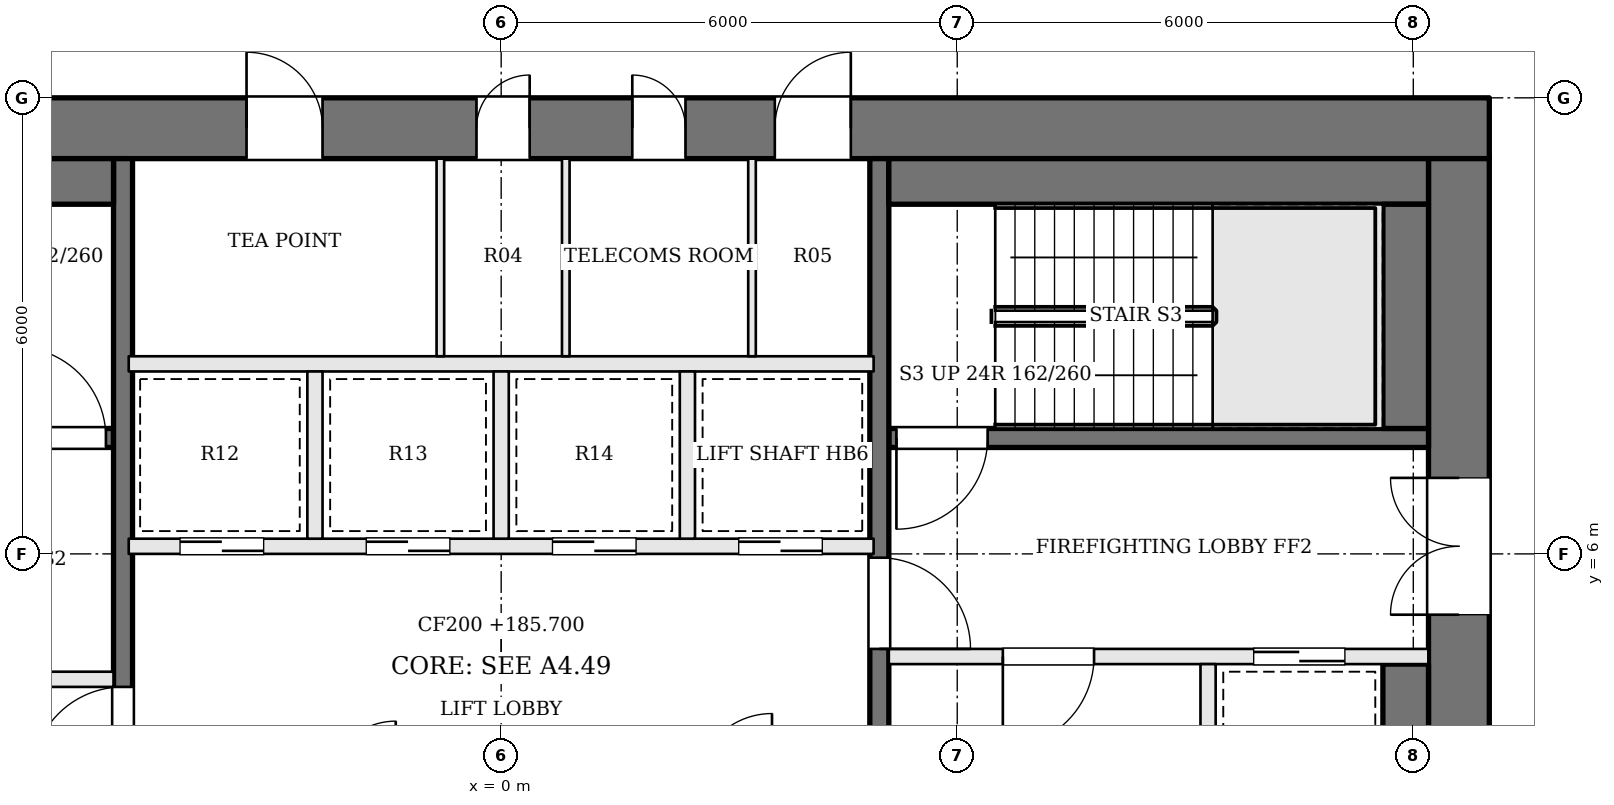
"""IFC4 building model, lengths in metres.
Left out: names, types, materials, properties, quantities, classifications, styles, units other than length and angle.
Written with IfcOpenShell. Run it as: python <this file> out.ifc"""

import sys

from ifc_helpers import new_model, si_unit, direction, frame, frame_2d, origin, place, context, subcontext, project, spatial, rectangle, extrude, element, fill, save


model = new_model("IFC4")
c1 = context("Model", 3, precision=1e-05, world=origin(), true_north=direction((0.0, 1.0)))
c2 = subcontext(c1, "Body", "Model", "MODEL_VIEW")
j1 = project(units=[si_unit("LENGTHUNIT", "METRE"), si_unit("PLANEANGLEUNIT", "RADIAN")], contexts=[c1])
p1 = place(None, origin())
s1 = spatial("IfcSite", under=j1, at=p1, CompositionType="ELEMENT")
p2 = place(p1, origin())
s2 = spatial("IfcBuilding", under=s1, at=p2, CompositionType="ELEMENT")
p3 = place(p2, frame((0.0, 0.0, 185.7)))
s3 = spatial("IfcBuildingStorey", under=s2, at=p3, CompositionType="ELEMENT", Elevation=185.7)
p4 = place(p3, frame((-13.0, 11.6, 0.0), z_axis=(0.0, 0.0, 1.0), x_axis=(1.0, 0.0, 0.0)))
e1 = element("IfcWall", 1, at=p4, inside=s3, PredefinedType="SHEAR", context=c2, shape_type="SweptSolid", body=[
    extrude(rectangle(XDim=26.0, YDim=0.8, at=frame_2d((13.0, 0.0))), origin(), (0.0, 0.0, 1.0), 3.9),
])
p5 = place(p4, frame((9.65, 0.0, 0.0)))
e2 = element("IfcOpeningElement", 2, at=p5, cuts=e1, PredefinedType="OPENING", context=c2, shape_type="SweptSolid", body=[
    extrude(rectangle(XDim=1.0, YDim=2.1, at=frame_2d((0.5, 1.05))), frame((0.0, 0.41, 0.0), z_axis=(0.0, -1.0, 0.0), x_axis=(1.0, 0.0, 0.0)), (0.0, 0.0, 1.0), 0.82),
])
p6 = place(p4, frame((12.675, 0.0, 0.0)))
e3 = element("IfcOpeningElement", 3, at=p6, cuts=e1, PredefinedType="OPENING", context=c2, shape_type="SweptSolid", body=[
    extrude(rectangle(XDim=0.7, YDim=2.1, at=frame_2d((0.35, 1.05))), frame((0.0, 0.41, 0.0), z_axis=(0.0, -1.0, 0.0), x_axis=(1.0, 0.0, 0.0)), (0.0, 0.0, 1.0), 0.82),
])
p7 = place(p4, frame((14.725, 0.0, 0.0)))
e4 = element("IfcOpeningElement", 4, at=p7, cuts=e1, PredefinedType="OPENING", context=c2, shape_type="SweptSolid", body=[
    extrude(rectangle(XDim=0.7, YDim=2.1, at=frame_2d((0.35, 1.05))), frame((0.0, 0.41, 0.0), z_axis=(0.0, -1.0, 0.0), x_axis=(1.0, 0.0, 0.0)), (0.0, 0.0, 1.0), 0.82),
])
p8 = place(p4, frame((16.6, 0.0, 0.0)))
e5 = element("IfcOpeningElement", 5, at=p8, cuts=e1, PredefinedType="OPENING", context=c2, shape_type="SweptSolid", body=[
    extrude(rectangle(XDim=1.0, YDim=2.1, at=frame_2d((0.5, 1.05))), frame((0.0, 0.41, 0.0), z_axis=(0.0, -1.0, 0.0), x_axis=(1.0, 0.0, 0.0)), (0.0, 0.0, 1.0), 0.82),
])
p9 = place(p3, frame((12.6, -2.2, 0.0), z_axis=(0.0, 0.0, 1.0), x_axis=(0.0, 1.0, 0.0)))
e6 = element("IfcWall", 6, at=p9, inside=s3, PredefinedType="SHEAR", context=c2, shape_type="SweptSolid", body=[
    extrude(rectangle(XDim=13.4, YDim=0.8, at=frame_2d((6.7, 0.0))), origin(), (0.0, 0.0, 1.0), 3.9),
])
p10 = place(p9, frame((7.4, 0.0, 0.0)))
e7 = element("IfcOpeningElement", 7, at=p10, cuts=e6, PredefinedType="OPENING", context=c2, shape_type="SweptSolid", body=[
    extrude(rectangle(XDim=1.8, YDim=2.1, at=frame_2d((0.9, 1.05))), frame((0.0, 0.41, 0.0), z_axis=(0.0, -1.0, 0.0), x_axis=(1.0, 0.0, 0.0)), (0.0, 0.0, 1.0), 0.82),
])
p11 = place(p3, frame((12.2, 7.525, 0.0), z_axis=(0.0, 0.0, 1.0), x_axis=(-1.0, 0.0, 0.0)))
e8 = element("IfcWall", 8, at=p11, inside=s3, PredefinedType="SOLIDWALL", context=c2, shape_type="SweptSolid", body=[
    extrude(rectangle(XDim=7.1, YDim=0.25, at=frame_2d((3.55, 0.0))), origin(), (0.0, 0.0, 1.0), 3.7),
])
p12 = place(p11, frame((5.8, 0.0, 0.0)))
e9 = element("IfcOpeningElement", 9, at=p12, cuts=e8, PredefinedType="OPENING", context=c2, shape_type="SweptSolid", body=[
    extrude(rectangle(XDim=1.2, YDim=2.1, at=frame_2d((0.6, 1.05))), frame((0.0, 0.135, 0.0), z_axis=(0.0, -1.0, 0.0), x_axis=(1.0, 0.0, 0.0)), (0.0, 0.0, 1.0), 0.27),
])
p13 = place(p3, frame((-12.2, 4.35, 0.0), z_axis=(0.0, 0.0, 1.0), x_axis=(1.0, 0.0, 0.0)))
e10 = element("IfcWall", 10, at=p13, inside=s3, PredefinedType="SOLIDWALL", context=c2, shape_type="SweptSolid", body=[
    extrude(rectangle(XDim=7.1, YDim=0.2, at=frame_2d((3.55, 0.0))), origin(), (0.0, 0.0, 1.0), 3.7),
])
p14 = place(p13, frame((4.4, 0.0, 0.0)))
e11 = element("IfcOpeningElement", 11, at=p14, cuts=e10, PredefinedType="OPENING", context=c2, shape_type="SweptSolid", body=[
    extrude(rectangle(XDim=1.2, YDim=2.1, at=frame_2d((0.6, 1.05))), frame((0.0, 0.11, 0.0), z_axis=(0.0, -1.0, 0.0), x_axis=(1.0, 0.0, 0.0)), (0.0, 0.0, 1.0), 0.22),
])
p15 = place(p13, frame((1.1, 0.0, 0.0)))
e12 = element("IfcOpeningElement", 12, at=p15, cuts=e10, PredefinedType="OPENING", context=c2, shape_type="SweptSolid", body=[
    extrude(rectangle(XDim=1.2, YDim=2.1, at=frame_2d((0.6, 1.05))), frame((0.0, 0.11, 0.0), z_axis=(0.0, -1.0, 0.0), x_axis=(1.0, 0.0, 0.0)), (0.0, 0.0, 1.0), 0.22),
])
p16 = place(p3, frame((12.2, 4.65, 0.0), z_axis=(0.0, 0.0, 1.0), x_axis=(-1.0, 0.0, 0.0)))
e13 = element("IfcWall", 13, at=p16, inside=s3, PredefinedType="SOLIDWALL", context=c2, shape_type="SweptSolid", body=[
    extrude(rectangle(XDim=7.1, YDim=0.2, at=frame_2d((3.55, 0.0))), origin(), (0.0, 0.0, 1.0), 3.7),
])
p17 = place(p16, frame((4.4, 0.0, 0.0)))
e14 = element("IfcOpeningElement", 14, at=p17, cuts=e13, PredefinedType="OPENING", context=c2, shape_type="SweptSolid", body=[
    extrude(rectangle(XDim=1.2, YDim=2.1, at=frame_2d((0.6, 1.05))), frame((0.0, 0.11, 0.0), z_axis=(0.0, -1.0, 0.0), x_axis=(1.0, 0.0, 0.0)), (0.0, 0.0, 1.0), 0.22),
])
p18 = place(p16, frame((1.1, 0.0, 0.0)))
e15 = element("IfcOpeningElement", 15, at=p18, cuts=e13, PredefinedType="OPENING", context=c2, shape_type="SweptSolid", body=[
    extrude(rectangle(XDim=1.2, YDim=2.1, at=frame_2d((0.6, 1.05))), frame((0.0, 0.11, 0.0), z_axis=(0.0, -1.0, 0.0), x_axis=(1.0, 0.0, 0.0)), (0.0, 0.0, 1.0), 0.22),
])
p19 = place(p3, frame((-12.2, 7.525, 0.0), z_axis=(0.0, 0.0, 1.0), x_axis=(1.0, 0.0, 0.0)))
e16 = element("IfcWall", 16, at=p19, inside=s3, PredefinedType="SOLIDWALL", context=c2, shape_type="SweptSolid", body=[
    extrude(rectangle(XDim=7.1, YDim=0.25, at=frame_2d((3.55, 0.0))), origin(), (0.0, 0.0, 1.0), 3.7),
])
p20 = place(p19, frame((5.8, 0.0, 0.0)))
e17 = element("IfcOpeningElement", 17, at=p20, cuts=e16, PredefinedType="OPENING", context=c2, shape_type="SweptSolid", body=[
    extrude(rectangle(XDim=1.2, YDim=2.1, at=frame_2d((0.6, 1.05))), frame((0.0, 0.135, 0.0), z_axis=(0.0, -1.0, 0.0), x_axis=(1.0, 0.0, 0.0)), (0.0, 0.0, 1.0), 0.27),
])
p21 = place(p3, frame((9.3, 4.55, 0.0), z_axis=(0.0, 0.0, 1.0), x_axis=(0.0, -1.0, 0.0)))
e18 = element("IfcWall", 18, at=p21, inside=s3, PredefinedType="SOLIDWALL", context=c2, shape_type="SweptSolid", body=[
    extrude(rectangle(XDim=3.0, YDim=0.2, at=frame_2d((1.5, 0.0))), origin(), (0.0, 0.0, 1.0), 3.7),
])
p22 = place(p3, frame((-4.975, -2.2, 0.0), z_axis=(0.0, 0.0, 1.0), x_axis=(0.0, 1.0, 0.0)))
e19 = element("IfcWall", 19, at=p22, inside=s3, PredefinedType="SOLIDWALL", context=c2, shape_type="SweptSolid", body=[
    extrude(rectangle(XDim=13.4, YDim=0.25, at=frame_2d((6.7, 0.0))), origin(), (0.0, 0.0, 1.0), 3.7),
])
p23 = place(p22, frame((5.25, 0.0, 0.0)))
e20 = element("IfcOpeningElement", 20, at=p23, cuts=e19, PredefinedType="OPENING", context=c2, shape_type="SweptSolid", body=[
    extrude(rectangle(XDim=1.2, YDim=2.1, at=frame_2d((0.6, 1.05))), frame((0.0, 0.135, 0.0), z_axis=(0.0, -1.0, 0.0), x_axis=(1.0, 0.0, 0.0)), (0.0, 0.0, 1.0), 0.27),
])
p24 = place(p3, frame((4.975, 11.2, 0.0), z_axis=(0.0, 0.0, 1.0), x_axis=(0.0, -1.0, 0.0)))
e21 = element("IfcWall", 21, at=p24, inside=s3, PredefinedType="SOLIDWALL", context=c2, shape_type="SweptSolid", body=[
    extrude(rectangle(XDim=13.4, YDim=0.25, at=frame_2d((6.7, 0.0))), origin(), (0.0, 0.0, 1.0), 3.7),
])
p25 = place(p24, frame((5.25, 0.0, 0.0)))
e22 = element("IfcOpeningElement", 22, at=p25, cuts=e21, PredefinedType="OPENING", context=c2, shape_type="SweptSolid", body=[
    extrude(rectangle(XDim=1.2, YDim=2.1, at=frame_2d((0.6, 1.05))), frame((0.0, 0.135, 0.0), z_axis=(0.0, -1.0, 0.0), x_axis=(1.0, 0.0, 0.0)), (0.0, 0.0, 1.0), 0.27),
])
for number, where, z_axis, x_axis in (
    (23, (-12.2, 10.9, 0.0), (0.0, 0.0, 1.0), (1.0, 0.0, 0.0)),
    (24, (12.2, 10.9, 0.0), (0.0, 0.0, 1.0), (-1.0, 0.0, 0.0)),
):
    element("IfcWall", number, at=place(p3, frame(where, z_axis=z_axis, x_axis=x_axis)), inside=s3, PredefinedType="SOLIDWALL", context=c2, shape_type="SweptSolid", body=[
        extrude(rectangle(XDim=7.1, YDim=0.6, at=frame_2d((3.55, 0.0))), origin(), (0.0, 0.0, 1.0), 3.7),
    ])
p26 = place(p3, frame((11.9, 10.6, 0.0), z_axis=(0.0, 0.0, 1.0), x_axis=(0.0, -1.0, 0.0)))
e25 = element("IfcWall", 25, at=p26, inside=s3, PredefinedType="SOLIDWALL", context=c2, shape_type="SweptSolid", body=[
    extrude(rectangle(XDim=2.95, YDim=0.6, at=frame_2d((1.475, 0.0))), origin(), (0.0, 0.0, 1.0), 3.7),
])
p27 = place(p3, frame((11.9, 4.55, 0.0), z_axis=(0.0, 0.0, 1.0), x_axis=(0.0, -1.0, 0.0)))
e26 = element("IfcWall", 26, at=p27, inside=s3, PredefinedType="SOLIDWALL", context=c2, shape_type="SweptSolid", body=[
    extrude(rectangle(XDim=3.0, YDim=0.6, at=frame_2d((1.5, 0.0))), origin(), (0.0, 0.0, 1.0), 3.7),
])
p28 = place(p3, frame((-4.9, 6.1, 0.0), z_axis=(0.0, 0.0, 1.0), x_axis=(1.0, 0.0, 0.0)))
e27 = element("IfcWall", 27, at=p28, inside=s3, PredefinedType="SOLIDWALL", context=c2, shape_type="SweptSolid", body=[
    extrude(rectangle(XDim=9.8, YDim=0.2, at=frame_2d((4.9, 0.0))), origin(), (0.0, 0.0, 1.0), 3.7),
])
p29 = place(p28, frame((0.675, 0.0, 0.0)))
e28 = element("IfcOpeningElement", 28, at=p29, cuts=e27, PredefinedType="OPENING", context=c2, shape_type="SweptSolid", body=[
    extrude(rectangle(XDim=1.1, YDim=2.1, at=frame_2d((0.55, 1.05))), frame((0.0, 0.11, 0.0), z_axis=(0.0, -1.0, 0.0), x_axis=(1.0, 0.0, 0.0)), (0.0, 0.0, 1.0), 0.22),
])
p30 = place(p28, frame((3.125, 0.0, 0.0)))
e29 = element("IfcOpeningElement", 29, at=p30, cuts=e27, PredefinedType="OPENING", context=c2, shape_type="SweptSolid", body=[
    extrude(rectangle(XDim=1.1, YDim=2.1, at=frame_2d((0.55, 1.05))), frame((0.0, 0.11, 0.0), z_axis=(0.0, -1.0, 0.0), x_axis=(1.0, 0.0, 0.0)), (0.0, 0.0, 1.0), 0.22),
])
p31 = place(p28, frame((5.575, 0.0, 0.0)))
e30 = element("IfcOpeningElement", 30, at=p31, cuts=e27, PredefinedType="OPENING", context=c2, shape_type="SweptSolid", body=[
    extrude(rectangle(XDim=1.1, YDim=2.1, at=frame_2d((0.55, 1.05))), frame((0.0, 0.11, 0.0), z_axis=(0.0, -1.0, 0.0), x_axis=(1.0, 0.0, 0.0)), (0.0, 0.0, 1.0), 0.22),
])
p32 = place(p28, frame((8.025, 0.0, 0.0)))
e31 = element("IfcOpeningElement", 31, at=p32, cuts=e27, PredefinedType="OPENING", context=c2, shape_type="SweptSolid", body=[
    extrude(rectangle(XDim=1.1, YDim=2.1, at=frame_2d((0.55, 1.05))), frame((0.0, 0.11, 0.0), z_axis=(0.0, -1.0, 0.0), x_axis=(1.0, 0.0, 0.0)), (0.0, 0.0, 1.0), 0.22),
])
p33 = place(p3, frame((-4.9, 8.5, 0.0), z_axis=(0.0, 0.0, 1.0), x_axis=(1.0, 0.0, 0.0)))
e32 = element("IfcWall", 32, at=p33, inside=s3, PredefinedType="SOLIDWALL", context=c2, shape_type="SweptSolid", body=[
    extrude(rectangle(XDim=9.8, YDim=0.2, at=frame_2d((4.9, 0.0))), origin(), (0.0, 0.0, 1.0), 3.7),
])
for number, where, z_axis, x_axis in (
    (33, (-2.45, 6.2, 0.0), (0.0, 0.0, 1.0), (0.0, 1.0, 0.0)),
    (34, (0.0, 6.2, 0.0), (0.0, 0.0, 1.0), (0.0, 1.0, 0.0)),
    (35, (2.45, 6.2, 0.0), (0.0, 0.0, 1.0), (0.0, 1.0, 0.0)),
):
    element("IfcWall", number, at=place(p3, frame(where, z_axis=z_axis, x_axis=x_axis)), inside=s3, PredefinedType="SOLIDWALL", context=c2, shape_type="SweptSolid", body=[
        extrude(rectangle(XDim=2.2, YDim=0.2, at=frame_2d((1.1, 0.0))), origin(), (0.0, 0.0, 1.0), 3.7),
    ])
for number, where, z_axis, x_axis in (
    (36, (-0.8, 8.6, 0.0), (0.0, 0.0, 1.0), (0.0, 1.0, 0.0)),
    (37, (0.85, 8.6, 0.0), (0.0, 0.0, 1.0), (0.0, 1.0, 0.0)),
    (38, (3.3, 8.6, 0.0), (0.0, 0.0, 1.0), (0.0, 1.0, 0.0)),
):
    element("IfcWall", number, at=place(p3, frame(where, z_axis=z_axis, x_axis=x_axis)), inside=s3, PredefinedType="PARTITIONING", context=c2, shape_type="SweptSolid", body=[
        extrude(rectangle(XDim=2.6, YDim=0.1, at=frame_2d((1.3, 0.0))), origin(), (0.0, 0.0, 1.0), 3.7),
    ])
p34 = place(p10, origin())
e39 = element("IfcDoor", 39, at=p34, inside=s3, OperationType="DOUBLE_DOOR_SINGLE_SWING", PredefinedType="DOOR", context=c2, shape_type="SweptSolid", body=[
    extrude(rectangle(XDim=1.8, YDim=2.1, at=frame_2d((0.9, 1.05))), frame((0.0, 0.025, 0.0), z_axis=(0.0, -1.0, 0.0), x_axis=(1.0, 0.0, 0.0)), (0.0, 0.0, 1.0), 0.05),
])
fill(e7, e39)
p35 = place(p23, origin())
e40 = element("IfcDoor", 40, at=p35, inside=s3, OperationType="SINGLE_SWING_LEFT", PredefinedType="DOOR", context=c2, shape_type="SweptSolid", body=[
    extrude(rectangle(XDim=1.2, YDim=2.1, at=frame_2d((0.6, 1.05))), frame((0.0, 0.025, 0.0), z_axis=(0.0, -1.0, 0.0), x_axis=(1.0, 0.0, 0.0)), (0.0, 0.0, 1.0), 0.05),
])
fill(e20, e40)
p36 = place(p25, origin())
e41 = element("IfcDoor", 41, at=p36, inside=s3, OperationType="SINGLE_SWING_RIGHT", PredefinedType="DOOR", context=c2, shape_type="SweptSolid", body=[
    extrude(rectangle(XDim=1.2, YDim=2.1, at=frame_2d((0.6, 1.05))), frame((0.0, 0.025, 0.0), z_axis=(0.0, -1.0, 0.0), x_axis=(1.0, 0.0, 0.0)), (0.0, 0.0, 1.0), 0.05),
])
fill(e22, e41)
p37 = place(p17, origin())
e42 = element("IfcDoor", 42, at=p37, inside=s3, OperationType="SINGLE_SWING_RIGHT", PredefinedType="DOOR", context=c2, shape_type="SweptSolid", body=[
    extrude(rectangle(XDim=1.2, YDim=2.1, at=frame_2d((0.6, 1.05))), frame((0.0, 0.025, 0.0), z_axis=(0.0, -1.0, 0.0), x_axis=(1.0, 0.0, 0.0)), (0.0, 0.0, 1.0), 0.05),
])
fill(e14, e42)
p38 = place(p12, origin())
e43 = element("IfcDoor", 43, at=p38, inside=s3, OperationType="SINGLE_SWING_RIGHT", PredefinedType="DOOR", context=c2, shape_type="SweptSolid", body=[
    extrude(rectangle(XDim=1.2, YDim=2.1, at=frame_2d((0.6, 1.05))), frame((0.0, 0.025, 0.0), z_axis=(0.0, -1.0, 0.0), x_axis=(1.0, 0.0, 0.0)), (0.0, 0.0, 1.0), 0.05),
])
fill(e9, e43)
p39 = place(p20, origin())
e44 = element("IfcDoor", 44, at=p39, inside=s3, OperationType="SINGLE_SWING_LEFT", PredefinedType="DOOR", context=c2, shape_type="SweptSolid", body=[
    extrude(rectangle(XDim=1.2, YDim=2.1, at=frame_2d((0.6, 1.05))), frame((0.0, 0.025, 0.0), z_axis=(0.0, -1.0, 0.0), x_axis=(1.0, 0.0, 0.0)), (0.0, 0.0, 1.0), 0.05),
])
fill(e17, e44)
p40 = place(p18, origin())
e45 = element("IfcDoor", 45, at=p40, inside=s3, OperationType="SLIDING_TO_RIGHT", PredefinedType="DOOR", context=c2, shape_type="SweptSolid", body=[
    extrude(rectangle(XDim=1.2, YDim=2.1, at=frame_2d((0.6, 1.05))), frame((0.0, 0.025, 0.0), z_axis=(0.0, -1.0, 0.0), x_axis=(1.0, 0.0, 0.0)), (0.0, 0.0, 1.0), 0.05),
])
fill(e15, e45)
p41 = place(p29, origin())
e46 = element("IfcDoor", 46, at=p41, inside=s3, OperationType="SLIDING_TO_RIGHT", PredefinedType="DOOR", context=c2, shape_type="SweptSolid", body=[
    extrude(rectangle(XDim=1.1, YDim=2.1, at=frame_2d((0.55, 1.05))), frame((0.0, 0.025, 0.0), z_axis=(0.0, -1.0, 0.0), x_axis=(1.0, 0.0, 0.0)), (0.0, 0.0, 1.0), 0.05),
])
fill(e28, e46)
p42 = place(p30, origin())
e47 = element("IfcDoor", 47, at=p42, inside=s3, OperationType="SLIDING_TO_LEFT", PredefinedType="DOOR", context=c2, shape_type="SweptSolid", body=[
    extrude(rectangle(XDim=1.1, YDim=2.1, at=frame_2d((0.55, 1.05))), frame((0.0, 0.025, 0.0), z_axis=(0.0, -1.0, 0.0), x_axis=(1.0, 0.0, 0.0)), (0.0, 0.0, 1.0), 0.05),
])
fill(e29, e47)
p43 = place(p31, origin())
e48 = element("IfcDoor", 48, at=p43, inside=s3, OperationType="SLIDING_TO_RIGHT", PredefinedType="DOOR", context=c2, shape_type="SweptSolid", body=[
    extrude(rectangle(XDim=1.1, YDim=2.1, at=frame_2d((0.55, 1.05))), frame((0.0, 0.025, 0.0), z_axis=(0.0, -1.0, 0.0), x_axis=(1.0, 0.0, 0.0)), (0.0, 0.0, 1.0), 0.05),
])
fill(e30, e48)
p44 = place(p32, origin())
e49 = element("IfcDoor", 49, at=p44, inside=s3, OperationType="SLIDING_TO_LEFT", PredefinedType="DOOR", context=c2, shape_type="SweptSolid", body=[
    extrude(rectangle(XDim=1.1, YDim=2.1, at=frame_2d((0.55, 1.05))), frame((0.0, 0.025, 0.0), z_axis=(0.0, -1.0, 0.0), x_axis=(1.0, 0.0, 0.0)), (0.0, 0.0, 1.0), 0.05),
])
fill(e31, e49)
p45 = place(p5, origin())
e50 = element("IfcDoor", 50, at=p45, inside=s3, OperationType="SINGLE_SWING_LEFT", PredefinedType="DOOR", context=c2, shape_type="SweptSolid", body=[
    extrude(rectangle(XDim=1.0, YDim=2.1, at=frame_2d((0.5, 1.05))), frame((0.0, 0.025, 0.0), z_axis=(0.0, -1.0, 0.0), x_axis=(1.0, 0.0, 0.0)), (0.0, 0.0, 1.0), 0.05),
])
fill(e2, e50)
p46 = place(p6, origin())
e51 = element("IfcDoor", 51, at=p46, inside=s3, OperationType="SINGLE_SWING_RIGHT", PredefinedType="DOOR", context=c2, shape_type="SweptSolid", body=[
    extrude(rectangle(XDim=0.7, YDim=2.1, at=frame_2d((0.35, 1.05))), frame((0.0, 0.025, 0.0), z_axis=(0.0, -1.0, 0.0), x_axis=(1.0, 0.0, 0.0)), (0.0, 0.0, 1.0), 0.05),
])
fill(e3, e51)
p47 = place(p7, origin())
e52 = element("IfcDoor", 52, at=p47, inside=s3, OperationType="SINGLE_SWING_LEFT", PredefinedType="DOOR", context=c2, shape_type="SweptSolid", body=[
    extrude(rectangle(XDim=0.7, YDim=2.1, at=frame_2d((0.35, 1.05))), frame((0.0, 0.025, 0.0), z_axis=(0.0, -1.0, 0.0), x_axis=(1.0, 0.0, 0.0)), (0.0, 0.0, 1.0), 0.05),
])
fill(e4, e52)
p48 = place(p8, origin())
e53 = element("IfcDoor", 53, at=p48, inside=s3, OperationType="SINGLE_SWING_RIGHT", PredefinedType="DOOR", context=c2, shape_type="SweptSolid", body=[
    extrude(rectangle(XDim=1.0, YDim=2.1, at=frame_2d((0.5, 1.05))), frame((0.0, 0.025, 0.0), z_axis=(0.0, -1.0, 0.0), x_axis=(1.0, 0.0, 0.0)), (0.0, 0.0, 1.0), 0.05),
])
fill(e5, e53)
save(model, sys.argv[1])
